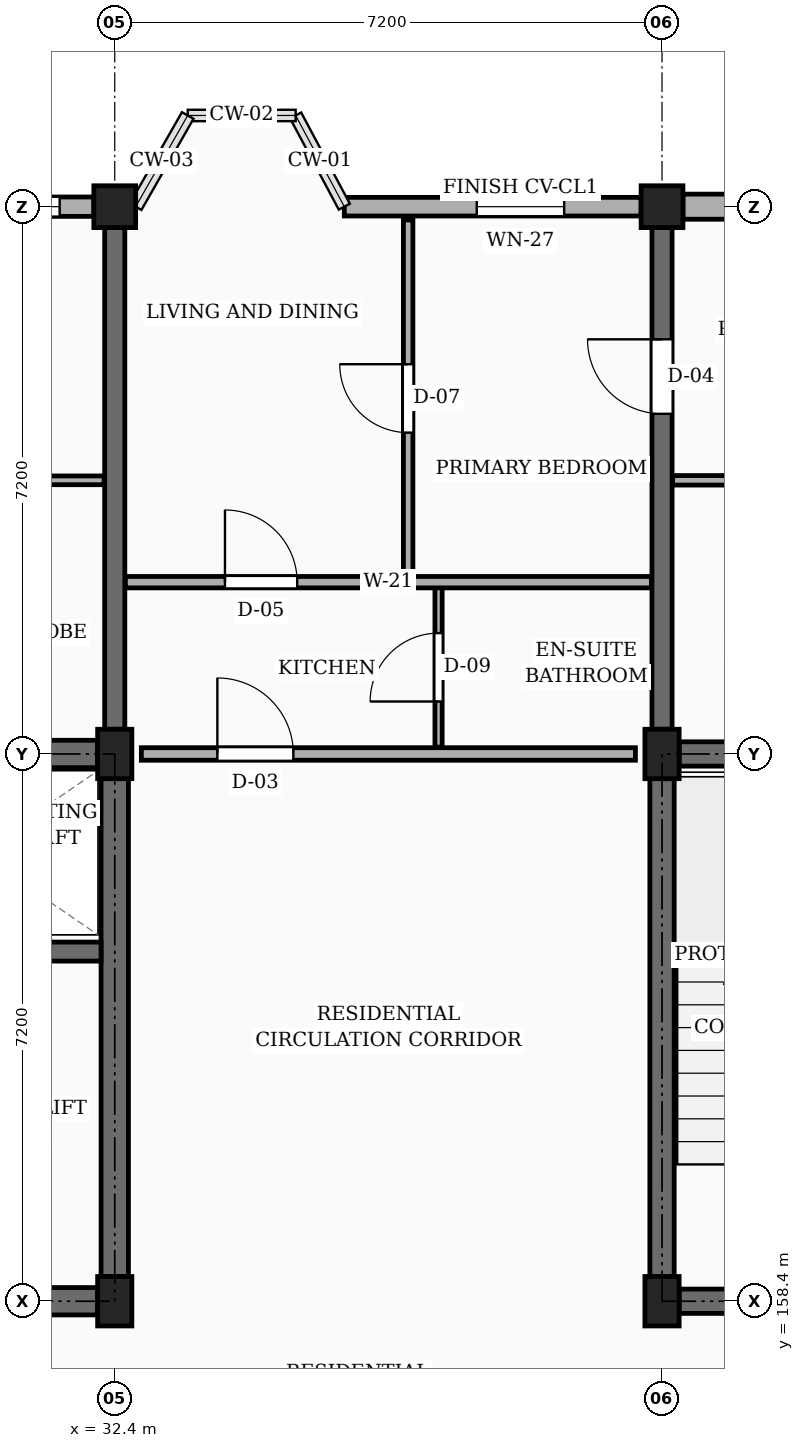
"""IFC4 building model, lengths in metres.
Left out: names, types, materials, properties, quantities, classifications, styles, units other than length and angle.
Written with IfcOpenShell. Run it as: python <this file> out.ifc"""

import sys

from ifc_helpers import new_model, si_unit, direction, frame, frame_2d, origin, origin_2d, place, context, subcontext, project, spatial, rectangle, extrude, element, fill, save


model = new_model("IFC4")
c1 = context("Model", 3, precision=1e-05, world=origin(), true_north=direction((0.0, 1.0)))
c2 = subcontext(c1, "Body", "Model", "MODEL_VIEW")
j1 = project(units=[si_unit("LENGTHUNIT", "METRE"), si_unit("PLANEANGLEUNIT", "RADIAN")], contexts=[c1])
p1 = place(None, origin())
s1 = spatial("IfcSite", under=j1, at=p1, CompositionType="ELEMENT")
p2 = place(p1, origin())
s2 = spatial("IfcBuilding", under=s1, at=p2, CompositionType="ELEMENT")
p3 = place(p2, frame((0.0, 0.0, 10.8)))
s3 = spatial("IfcBuildingStorey", under=s2, at=p3, CompositionType="ELEMENT", Elevation=10.8)
for number, where, z_axis, x_axis in (
    (1, (32.4, 158.4, 0.0), (0.0, 0.0, 1.0), (1.0, 0.0, 0.0)),
    (2, (32.4, 165.6, 0.0), (0.0, 0.0, 1.0), (1.0, 0.0, 0.0)),
):
    element("IfcColumn", number, at=place(p3, frame(where, z_axis=z_axis, x_axis=x_axis)), inside=s3, PredefinedType="COLUMN", context=c2, shape_type="SweptSolid", body=[
        extrude(rectangle(XDim=0.45, YDim=0.65, at=origin_2d()), origin(), (0.0, 0.0, 1.0), 3.15),
    ])
p4 = place(p3, frame((32.4, 172.8, 0.0), z_axis=(0.0, 0.0, 1.0), x_axis=(1.0, 0.0, 0.0)))
e3 = element("IfcColumn", 3, at=p4, inside=s3, PredefinedType="COLUMN", context=c2, shape_type="SweptSolid", body=[
    extrude(rectangle(XDim=0.55, YDim=0.55, at=origin_2d()), origin(), (0.0, 0.0, 1.0), 3.15),
])
for number, where, z_axis, x_axis in (
    (4, (39.6, 158.4, 0.0), (0.0, 0.0, 1.0), (1.0, 0.0, 0.0)),
    (5, (39.6, 165.6, 0.0), (0.0, 0.0, 1.0), (1.0, 0.0, 0.0)),
):
    element("IfcColumn", number, at=place(p3, frame(where, z_axis=z_axis, x_axis=x_axis)), inside=s3, PredefinedType="COLUMN", context=c2, shape_type="SweptSolid", body=[
        extrude(rectangle(XDim=0.45, YDim=0.65, at=origin_2d()), origin(), (0.0, 0.0, 1.0), 3.15),
    ])
p5 = place(p3, frame((39.6, 172.8, 0.0), z_axis=(0.0, 0.0, 1.0), x_axis=(1.0, 0.0, 0.0)))
e6 = element("IfcColumn", 6, at=p5, inside=s3, PredefinedType="COLUMN", context=c2, shape_type="SweptSolid", body=[
    extrude(rectangle(XDim=0.55, YDim=0.55, at=origin_2d()), origin(), (0.0, 0.0, 1.0), 3.15),
])
p6 = place(p3, frame((32.4, 165.925, 0.0), z_axis=(0.0, 0.0, 1.0), x_axis=(0.0, 1.0, 0.0)))
e7 = element("IfcWall", 7, at=p6, inside=s3, PredefinedType="SOLIDWALL", context=c2, shape_type="SweptSolid", body=[
    extrude(rectangle(XDim=6.6, YDim=0.265, at=frame_2d((3.3, 0.0))), origin(), (0.0, 0.0, 1.0), 2.185),
])
p7 = place(p3, frame((39.6, 165.925, 0.0), z_axis=(0.0, 0.0, 1.0), x_axis=(0.0, 1.0, 0.0)))
e8 = element("IfcWall", 8, at=p7, inside=s3, PredefinedType="SOLIDWALL", context=c2, shape_type="SweptSolid", body=[
    extrude(rectangle(XDim=6.6, YDim=0.265, at=frame_2d((3.3, 0.0))), origin(), (0.0, 0.0, 1.0), 2.185),
])
p8 = place(p7, frame((4.15, 0.0, 0.0)))
e9 = element("IfcOpeningElement", 9, at=p8, cuts=e8, PredefinedType="OPENING", context=c2, shape_type="SweptSolid", body=[
    extrude(rectangle(XDim=0.98, YDim=2.12, at=frame_2d((0.49, 1.06))), frame((0.0, 0.143, 0.0), z_axis=(0.0, -1.0, 0.0), x_axis=(1.0, 0.0, 0.0)), (0.0, 0.0, 1.0), 0.285),
])
p9 = place(p3, frame((46.525, 172.8, 0.0), z_axis=(0.0, 0.0, 1.0), x_axis=(-1.0, 0.0, 0.0)))
e10 = element("IfcWall", 10, at=p9, inside=s3, PredefinedType="SOLIDWALL", context=c2, shape_type="SweptSolid", body=[
    extrude(rectangle(XDim=6.65, YDim=0.33, at=frame_2d((3.325, 0.0))), origin(), (0.0, 0.0, 1.0), 2.455),
])
p10 = place(p9, frame((0.45, 0.0, 0.78)))
e11 = element("IfcOpeningElement", 11, at=p10, cuts=e10, PredefinedType="OPENING", context=c2, shape_type="SweptSolid", body=[
    extrude(rectangle(XDim=0.94, YDim=1.44, at=frame_2d((0.47, 0.72))), frame((0.0, 0.175, 0.0), z_axis=(0.0, -1.0, 0.0), x_axis=(1.0, 0.0, 0.0)), (0.0, 0.0, 1.0), 0.35),
])
p11 = place(p9, frame((4.65, 0.0, 0.78)))
e12 = element("IfcOpeningElement", 12, at=p11, cuts=e10, PredefinedType="OPENING", context=c2, shape_type="SweptSolid", body=[
    extrude(rectangle(XDim=1.15, YDim=1.44, at=frame_2d((0.575, 0.72))), frame((0.0, 0.175, 0.0), z_axis=(0.0, -1.0, 0.0), x_axis=(1.0, 0.0, 0.0)), (0.0, 0.0, 1.0), 0.35),
])
p12 = place(p3, frame((39.325, 172.8, 0.0), z_axis=(0.0, 0.0, 1.0), x_axis=(-1.0, 0.0, 0.0)))
e13 = element("IfcWall", 13, at=p12, inside=s3, PredefinedType="SOLIDWALL", context=c2, shape_type="SweptSolid", body=[
    extrude(rectangle(XDim=3.905, YDim=0.245, at=frame_2d((1.953, 0.0))), origin(), (0.0, 0.0, 1.0), 2.455),
])
p13 = place(p12, frame((1.012, 0.0, 0.78)))
e14 = element("IfcOpeningElement", 14, at=p13, cuts=e13, PredefinedType="OPENING", context=c2, shape_type="SweptSolid", body=[
    extrude(rectangle(XDim=1.15, YDim=1.44, at=frame_2d((0.575, 0.72))), frame((0.0, 0.133, 0.0), z_axis=(0.0, -1.0, 0.0), x_axis=(1.0, 0.0, 0.0)), (0.0, 0.0, 1.0), 0.265),
])
p14 = place(p3, frame((32.125, 172.8, 0.0), z_axis=(0.0, 0.0, 1.0), x_axis=(-1.0, 0.0, 0.0)))
e15 = element("IfcWall", 15, at=p14, inside=s3, PredefinedType="SOLIDWALL", context=c2, shape_type="SweptSolid", body=[
    extrude(rectangle(XDim=6.65, YDim=0.255, at=frame_2d((3.325, 0.0))), origin(), (0.0, 0.0, 1.0), 2.455),
])
p15 = place(p14, frame((0.45, 0.0, 0.78)))
e16 = element("IfcOpeningElement", 16, at=p15, cuts=e15, PredefinedType="OPENING", context=c2, shape_type="SweptSolid", body=[
    extrude(rectangle(XDim=1.25, YDim=1.44, at=frame_2d((0.625, 0.72))), frame((0.0, 0.137, 0.0), z_axis=(0.0, -1.0, 0.0), x_axis=(1.0, 0.0, 0.0)), (0.0, 0.0, 1.0), 0.275),
])
p16 = place(p14, frame((4.65, 0.0, 0.78)))
e17 = element("IfcOpeningElement", 17, at=p16, cuts=e15, PredefinedType="OPENING", context=c2, shape_type="SweptSolid", body=[
    extrude(rectangle(XDim=1.45, YDim=1.44, at=frame_2d((0.725, 0.72))), frame((0.0, 0.137, 0.0), z_axis=(0.0, -1.0, 0.0), x_axis=(1.0, 0.0, 0.0)), (0.0, 0.0, 1.0), 0.275),
])
p17 = place(p3, frame((25.425, 165.6, 0.0), z_axis=(0.0, 0.0, 1.0), x_axis=(1.0, 0.0, 0.0)))
e18 = element("IfcWall", 18, at=p17, inside=s3, PredefinedType="SHEAR", context=c2, shape_type="SweptSolid", body=[
    extrude(rectangle(XDim=6.75, YDim=0.36, at=frame_2d((3.375, 0.0))), origin(), (0.0, 0.0, 1.0), 2.885),
])
p18 = place(p3, frame((32.4, 158.725, 0.0), z_axis=(0.0, 0.0, 1.0), x_axis=(0.0, 1.0, 0.0)))
e19 = element("IfcWall", 19, at=p18, inside=s3, PredefinedType="SHEAR", context=c2, shape_type="SweptSolid", body=[
    extrude(rectangle(XDim=6.55, YDim=0.36, at=frame_2d((3.275, 0.0))), origin(), (0.0, 0.0, 1.0), 2.885),
])
p19 = place(p3, frame((25.425, 158.4, 0.0), z_axis=(0.0, 0.0, 1.0), x_axis=(1.0, 0.0, 0.0)))
e20 = element("IfcWall", 20, at=p19, inside=s3, PredefinedType="SHEAR", context=c2, shape_type="SweptSolid", body=[
    extrude(rectangle(XDim=6.75, YDim=0.36, at=frame_2d((3.375, 0.0))), origin(), (0.0, 0.0, 1.0), 2.885),
])
p20 = place(p19, frame((4.525, 0.0, 0.0)))
e21 = element("IfcOpeningElement", 21, at=p20, cuts=e20, PredefinedType="OPENING", context=c2, shape_type="SweptSolid", body=[
    extrude(rectangle(XDim=1.1, YDim=2.15, at=frame_2d((0.55, 1.075))), frame((0.0, 0.19, 0.0), z_axis=(0.0, -1.0, 0.0), x_axis=(1.0, 0.0, 0.0)), (0.0, 0.0, 1.0), 0.38),
])
p21 = place(p3, frame((28.925, 163.0, 0.0), z_axis=(0.0, 0.0, 1.0), x_axis=(1.0, 0.0, 0.0)))
e22 = element("IfcWall", 22, at=p21, inside=s3, PredefinedType="SHEAR", context=c2, shape_type="SweptSolid", body=[
    extrude(rectangle(XDim=3.295, YDim=0.25, at=frame_2d((1.647, 0.0))), origin(), (0.0, 0.0, 1.0), 2.885),
])
p22 = place(p21, frame((1.1, 0.0, 0.0)))
e23 = element("IfcOpeningElement", 23, at=p22, cuts=e22, PredefinedType="OPENING", context=c2, shape_type="SweptSolid", body=[
    extrude(rectangle(XDim=1.1, YDim=2.2, at=frame_2d((0.55, 1.1))), frame((0.0, 0.135, 0.0), z_axis=(0.0, -1.0, 0.0), x_axis=(1.0, 0.0, 0.0)), (0.0, 0.0, 1.0), 0.27),
])
p23 = place(p3, frame((39.6, 158.725, 0.0), z_axis=(0.0, 0.0, 1.0), x_axis=(0.0, 1.0, 0.0)))
e24 = element("IfcWall", 24, at=p23, inside=s3, PredefinedType="SHEAR", context=c2, shape_type="SweptSolid", body=[
    extrude(rectangle(XDim=6.55, YDim=0.32, at=frame_2d((3.275, 0.0))), origin(), (0.0, 0.0, 1.0), 2.885),
])
p24 = place(p3, frame((39.825, 165.6, 0.0), z_axis=(0.0, 0.0, 1.0), x_axis=(1.0, 0.0, 0.0)))
e25 = element("IfcWall", 25, at=p24, inside=s3, PredefinedType="SHEAR", context=c2, shape_type="SweptSolid", body=[
    extrude(rectangle(XDim=6.75, YDim=0.32, at=frame_2d((3.375, 0.0))), origin(), (0.0, 0.0, 1.0), 2.885),
])
p25 = place(p3, frame((39.825, 158.4, 0.0), z_axis=(0.0, 0.0, 1.0), x_axis=(1.0, 0.0, 0.0)))
e26 = element("IfcWall", 26, at=p25, inside=s3, PredefinedType="SHEAR", context=c2, shape_type="SweptSolid", body=[
    extrude(rectangle(XDim=6.75, YDim=0.32, at=frame_2d((3.375, 0.0))), origin(), (0.0, 0.0, 1.0), 2.885),
])
p26 = place(p25, frame((4.525, 0.0, 0.0)))
e27 = element("IfcOpeningElement", 27, at=p26, cuts=e26, PredefinedType="OPENING", context=c2, shape_type="SweptSolid", body=[
    extrude(rectangle(XDim=1.1, YDim=2.15, at=frame_2d((0.55, 1.075))), frame((0.0, 0.17, 0.0), z_axis=(0.0, -1.0, 0.0), x_axis=(1.0, 0.0, 0.0)), (0.0, 0.0, 1.0), 0.34),
])
p27 = place(p3, frame((32.75, 165.6, 0.0), z_axis=(0.0, 0.0, 1.0), x_axis=(1.0, 0.0, 0.0)))
e28 = element("IfcWall", 28, at=p27, inside=s3, PredefinedType="PARTITIONING", context=c2, shape_type="SweptSolid", body=[
    extrude(rectangle(XDim=6.5, YDim=0.165, at=frame_2d((3.25, 0.0))), origin(), (0.0, 0.0, 1.0), 2.235),
])
p28 = place(p27, frame((1.0, 0.0, 0.0)))
e29 = element("IfcOpeningElement", 29, at=p28, cuts=e28, PredefinedType="OPENING", context=c2, shape_type="SweptSolid", body=[
    extrude(rectangle(XDim=1.0, YDim=2.15, at=frame_2d((0.5, 1.075))), frame((0.0, 0.093, 0.0), z_axis=(0.0, -1.0, 0.0), x_axis=(1.0, 0.0, 0.0)), (0.0, 0.0, 1.0), 0.185),
])
p29 = place(p3, frame((25.34, 169.2, 0.0), z_axis=(0.0, 0.0, 1.0), x_axis=(1.0, 0.0, 0.0)))
e30 = element("IfcWall", 30, at=p29, inside=s3, PredefinedType="PARTITIONING", context=c2, shape_type="SweptSolid", body=[
    extrude(rectangle(XDim=6.92, YDim=0.115, at=frame_2d((3.46, 0.0))), origin(), (0.0, 0.0, 1.0), 2.32),
])
p30 = place(p29, frame((1.05, 0.0, 0.0)))
e31 = element("IfcOpeningElement", 31, at=p30, cuts=e30, PredefinedType="OPENING", context=c2, shape_type="SweptSolid", body=[
    extrude(rectangle(XDim=0.87, YDim=2.05, at=frame_2d((0.435, 1.025))), frame((0.0, 0.067, 0.0), z_axis=(0.0, -1.0, 0.0), x_axis=(1.0, 0.0, 0.0)), (0.0, 0.0, 1.0), 0.135),
])
p31 = place(p29, frame((4.45, 0.0, 0.0)))
e32 = element("IfcOpeningElement", 32, at=p31, cuts=e30, PredefinedType="OPENING", context=c2, shape_type="SweptSolid", body=[
    extrude(rectangle(XDim=0.88, YDim=2.08, at=frame_2d((0.44, 1.04))), frame((0.0, 0.067, 0.0), z_axis=(0.0, -1.0, 0.0), x_axis=(1.0, 0.0, 0.0)), (0.0, 0.0, 1.0), 0.135),
])
p32 = place(p3, frame((36.26, 167.93, 0.0), z_axis=(0.0, 0.0, 1.0), x_axis=(0.0, 1.0, 0.0)))
e33 = element("IfcWall", 33, at=p32, inside=s3, PredefinedType="PARTITIONING", context=c2, shape_type="SweptSolid", body=[
    extrude(rectangle(XDim=4.695, YDim=0.125, at=frame_2d((2.348, 0.0))), origin(), (0.0, 0.0, 1.0), 2.32),
])
p33 = place(p32, frame((1.897, 0.0, 0.0)))
e34 = element("IfcOpeningElement", 34, at=p33, cuts=e33, PredefinedType="OPENING", context=c2, shape_type="SweptSolid", body=[
    extrude(rectangle(XDim=0.9, YDim=2.1, at=frame_2d((0.45, 1.05))), frame((0.0, 0.073, 0.0), z_axis=(0.0, -1.0, 0.0), x_axis=(1.0, 0.0, 0.0)), (0.0, 0.0, 1.0), 0.145),
])
p34 = place(p3, frame((36.66, 165.69, 0.0), z_axis=(0.0, 0.0, 1.0), x_axis=(0.0, 1.0, 0.0)))
e35 = element("IfcWall", 35, at=p34, inside=s3, PredefinedType="PARTITIONING", context=c2, shape_type="SweptSolid", body=[
    extrude(rectangle(XDim=2.1, YDim=0.095, at=frame_2d((1.05, 0.0))), origin(), (0.0, 0.0, 1.0), 2.32),
])
p35 = place(p34, frame((0.6, 0.0, 0.0)))
e36 = element("IfcOpeningElement", 36, at=p35, cuts=e35, PredefinedType="OPENING", context=c2, shape_type="SweptSolid", body=[
    extrude(rectangle(XDim=0.9, YDim=2.05, at=frame_2d((0.45, 1.025))), frame((0.0, 0.058, 0.0), z_axis=(0.0, -1.0, 0.0), x_axis=(1.0, 0.0, 0.0)), (0.0, 0.0, 1.0), 0.115),
])
p36 = place(p3, frame((32.54, 167.86, 0.0), z_axis=(0.0, 0.0, 1.0), x_axis=(1.0, 0.0, 0.0)))
e37 = element("IfcWall", 37, at=p36, inside=s3, PredefinedType="PARTITIONING", context=c2, shape_type="SweptSolid", body=[
    extrude(rectangle(XDim=6.92, YDim=0.15, at=frame_2d((3.46, 0.0))), origin(), (0.0, 0.0, 1.0), 2.32),
])
p37 = place(p36, frame((1.31, 0.0, 0.0)))
e38 = element("IfcOpeningElement", 38, at=p37, cuts=e37, PredefinedType="OPENING", context=c2, shape_type="SweptSolid", body=[
    extrude(rectangle(XDim=0.95, YDim=2.1, at=frame_2d((0.475, 1.05))), frame((0.0, 0.085, 0.0), z_axis=(0.0, -1.0, 0.0), x_axis=(1.0, 0.0, 0.0)), (0.0, 0.0, 1.0), 0.17),
])
p38 = place(p3, frame((39.74, 169.2, 0.0), z_axis=(0.0, 0.0, 1.0), x_axis=(1.0, 0.0, 0.0)))
e39 = element("IfcWall", 39, at=p38, inside=s3, PredefinedType="PARTITIONING", context=c2, shape_type="SweptSolid", body=[
    extrude(rectangle(XDim=6.92, YDim=0.125, at=frame_2d((3.46, 0.0))), origin(), (0.0, 0.0, 1.0), 2.32),
])
p39 = place(p38, frame((1.05, 0.0, 0.0)))
e40 = element("IfcOpeningElement", 40, at=p39, cuts=e39, PredefinedType="OPENING", context=c2, shape_type="SweptSolid", body=[
    extrude(rectangle(XDim=0.87, YDim=2.05, at=frame_2d((0.435, 1.025))), frame((0.0, 0.073, 0.0), z_axis=(0.0, -1.0, 0.0), x_axis=(1.0, 0.0, 0.0)), (0.0, 0.0, 1.0), 0.145),
])
p40 = place(p38, frame((4.45, 0.0, 0.0)))
e41 = element("IfcOpeningElement", 41, at=p40, cuts=e39, PredefinedType="OPENING", context=c2, shape_type="SweptSolid", body=[
    extrude(rectangle(XDim=0.88, YDim=2.08, at=frame_2d((0.44, 1.04))), frame((0.0, 0.073, 0.0), z_axis=(0.0, -1.0, 0.0), x_axis=(1.0, 0.0, 0.0)), (0.0, 0.0, 1.0), 0.145),
])
p41 = place(p13, origin())
e42 = element("IfcWindow", 42, at=p41, inside=s3, PartitioningType="SINGLE_PANEL", PredefinedType="WINDOW", context=c2, shape_type="SweptSolid", body=[
    extrude(rectangle(XDim=1.15, YDim=1.44, at=frame_2d((0.575, 0.72))), frame((0.0, 0.03, 0.0), z_axis=(0.0, -1.0, 0.0), x_axis=(1.0, 0.0, 0.0)), (0.0, 0.0, 1.0), 0.06),
])
fill(e14, e42)
p42 = place(p15, origin())
e43 = element("IfcWindow", 43, at=p42, inside=s3, PartitioningType="SINGLE_PANEL", PredefinedType="WINDOW", context=c2, shape_type="SweptSolid", body=[
    extrude(rectangle(XDim=1.25, YDim=1.44, at=frame_2d((0.625, 0.72))), frame((0.0, 0.03, 0.0), z_axis=(0.0, -1.0, 0.0), x_axis=(1.0, 0.0, 0.0)), (0.0, 0.0, 1.0), 0.06),
])
fill(e16, e43)
p43 = place(p28, origin())
e44 = element("IfcDoor", 44, at=p43, inside=s3, OperationType="SINGLE_SWING_LEFT", PredefinedType="DOOR", context=c2, shape_type="SweptSolid", body=[
    extrude(rectangle(XDim=1.0, YDim=2.15, at=frame_2d((0.5, 1.075))), frame((0.0, 0.025, 0.0), z_axis=(0.0, -1.0, 0.0), x_axis=(1.0, 0.0, 0.0)), (0.0, 0.0, 1.0), 0.05),
])
fill(e29, e44)
p44 = place(p33, origin())
e45 = element("IfcDoor", 45, at=p44, inside=s3, OperationType="SINGLE_SWING_RIGHT", PredefinedType="DOOR", context=c2, shape_type="SweptSolid", body=[
    extrude(rectangle(XDim=0.9, YDim=2.1, at=frame_2d((0.45, 1.05))), frame((0.0, 0.025, 0.0), z_axis=(0.0, -1.0, 0.0), x_axis=(1.0, 0.0, 0.0)), (0.0, 0.0, 1.0), 0.05),
])
fill(e34, e45)
p45 = place(p35, origin())
e46 = element("IfcDoor", 46, at=p45, inside=s3, OperationType="SINGLE_SWING_LEFT", PredefinedType="DOOR", context=c2, shape_type="SweptSolid", body=[
    extrude(rectangle(XDim=0.9, YDim=2.05, at=frame_2d((0.45, 1.025))), frame((0.0, 0.025, 0.0), z_axis=(0.0, -1.0, 0.0), x_axis=(1.0, 0.0, 0.0)), (0.0, 0.0, 1.0), 0.05),
])
fill(e36, e46)
p46 = place(p37, origin())
e47 = element("IfcDoor", 47, at=p46, inside=s3, OperationType="SINGLE_SWING_LEFT", PredefinedType="DOOR", context=c2, shape_type="SweptSolid", body=[
    extrude(rectangle(XDim=0.95, YDim=2.1, at=frame_2d((0.475, 1.05))), frame((0.0, 0.025, 0.0), z_axis=(0.0, -1.0, 0.0), x_axis=(1.0, 0.0, 0.0)), (0.0, 0.0, 1.0), 0.05),
])
fill(e38, e47)
p47 = place(p8, origin())
e48 = element("IfcDoor", 48, at=p47, inside=s3, OperationType="SINGLE_SWING_RIGHT", PredefinedType="DOOR", context=c2, shape_type="SweptSolid", body=[
    extrude(rectangle(XDim=0.98, YDim=2.12, at=frame_2d((0.49, 1.06))), frame((0.0, 0.025, 0.0), z_axis=(0.0, -1.0, 0.0), x_axis=(1.0, 0.0, 0.0)), (0.0, 0.0, 1.0), 0.05),
])
fill(e9, e48)
save(model, sys.argv[1])
